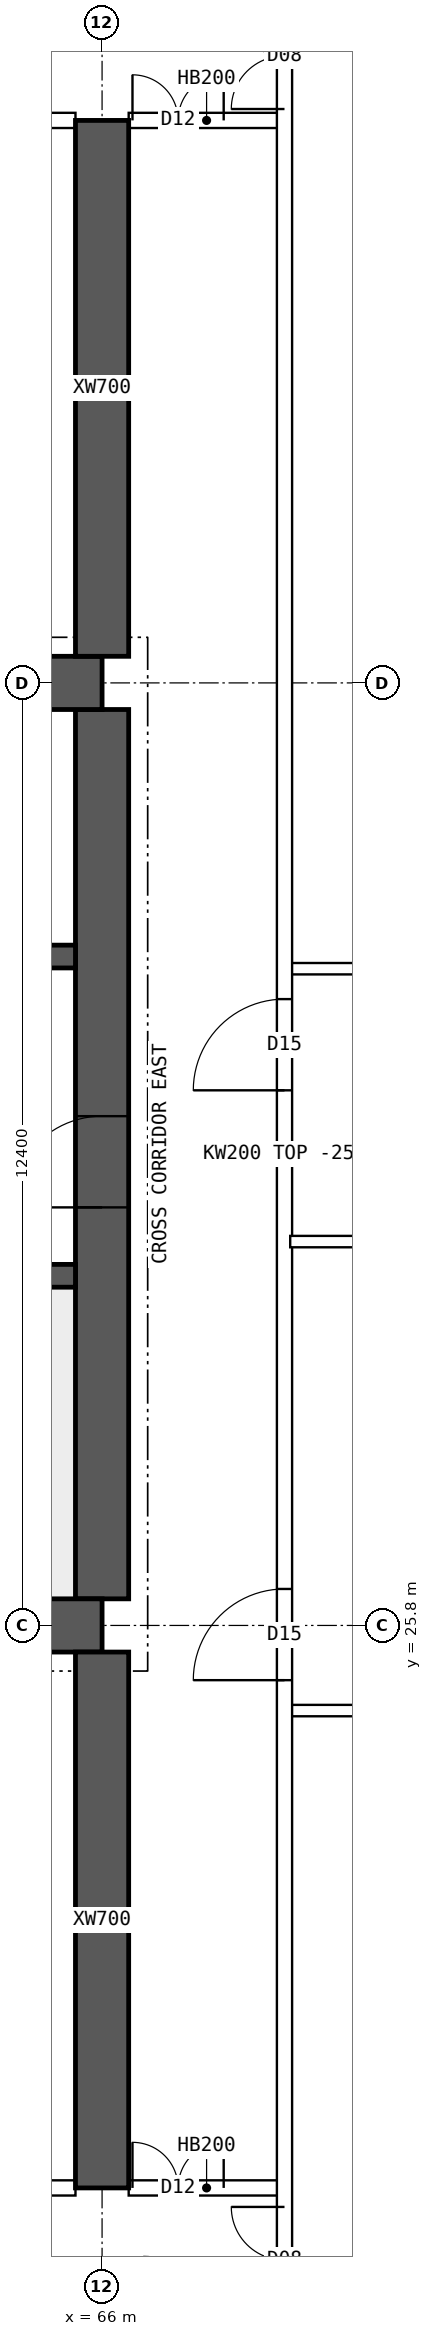
"""IFC4 building model, lengths in metres.
Left out: names, types, materials, properties, quantities, classifications, styles, units other than length and angle.
Written with IfcOpenShell. Run it as: python <this file> out.ifc"""

import sys

from ifc_helpers import new_model, si_unit, direction, frame, frame_2d, origin, place, context, subcontext, project, spatial, polyline, rectangle, outline, extrude, element, fill, save


model = new_model("IFC4")
c1 = context("Model", 3, precision=1e-05, world=origin(), true_north=direction((0.0, 1.0)))
c2 = subcontext(c1, "Body", "Model", "MODEL_VIEW")
j1 = project(units=[si_unit("LENGTHUNIT", "METRE"), si_unit("PLANEANGLEUNIT", "RADIAN")], contexts=[c1])
p1 = place(None, origin())
s1 = spatial("IfcSite", under=j1, at=p1, CompositionType="ELEMENT")
p2 = place(p1, origin())
s2 = spatial("IfcBuilding", under=s1, at=p2, CompositionType="ELEMENT")
p3 = place(p2, frame((0.0, 0.0, 208.3)))
s3 = spatial("IfcBuildingStorey", under=s2, at=p3, CompositionType="ELEMENT", Elevation=208.3)
for number, where, z_axis, x_axis in (
    (1, (18.0, 25.8, 0.0), (0.0, 0.0, 1.0), (1.0, 0.0, 0.0)),
    (2, (18.0, 38.2, 0.0), (0.0, 0.0, 1.0), (1.0, 0.0, 0.0)),
):
    element("IfcWall", number, at=place(p3, frame(where, z_axis=z_axis, x_axis=x_axis)), inside=s3, PredefinedType="SHEAR", context=c2, shape_type="SweptSolid", body=[
        extrude(rectangle(XDim=48.0, YDim=0.7, at=frame_2d((24.0, 0.0))), origin(), (0.0, 0.0, 1.0), 4.5),
    ])
p4 = place(p3, frame((66.0, 26.15, 0.0), z_axis=(0.0, 0.0, 1.0), x_axis=(0.0, 1.0, 0.0)))
e3 = element("IfcWall", 3, at=p4, inside=s3, PredefinedType="SHEAR", context=c2, shape_type="SweptSolid", body=[
    extrude(rectangle(XDim=11.7, YDim=0.7, at=frame_2d((5.85, 0.0))), origin(), (0.0, 0.0, 1.0), 4.5),
])
p5 = place(p4, frame((5.15, 0.0, 0.0)))
e4 = element("IfcOpeningElement", 4, at=p5, cuts=e3, PredefinedType="OPENING", context=c2, shape_type="SweptSolid", body=[
    extrude(rectangle(XDim=1.2, YDim=2.1, at=frame_2d((0.6, 1.05))), frame((0.0, 0.36, 0.0), z_axis=(0.0, -1.0, 0.0), x_axis=(1.0, 0.0, 0.0)), (0.0, 0.0, 1.0), 0.72),
])
p6 = place(p3, frame((18.35, 30.4, 0.0), z_axis=(0.0, 0.0, 1.0), x_axis=(1.0, 0.0, 0.0)))
e5 = element("IfcWall", 5, at=p6, inside=s3, PredefinedType="SHEAR", context=c2, shape_type="SweptSolid", body=[
    extrude(rectangle(XDim=47.3, YDim=0.3, at=frame_2d((23.65, 0.0))), origin(), (0.0, 0.0, 1.0), 4.5),
])
p7 = place(p6, frame((0.4, 0.0, 0.0)))
e6 = element("IfcOpeningElement", 6, at=p7, cuts=e5, PredefinedType="OPENING", context=c2, shape_type="SweptSolid", body=[
    extrude(rectangle(XDim=1.0, YDim=2.1, at=frame_2d((0.5, 1.05))), frame((0.0, 0.16, 0.0), z_axis=(0.0, -1.0, 0.0), x_axis=(1.0, 0.0, 0.0)), (0.0, 0.0, 1.0), 0.32),
])
p8 = place(p6, frame((45.9, 0.0, 0.0)))
e7 = element("IfcOpeningElement", 7, at=p8, cuts=e5, PredefinedType="OPENING", context=c2, shape_type="SweptSolid", body=[
    extrude(rectangle(XDim=1.0, YDim=2.1, at=frame_2d((0.5, 1.05))), frame((0.0, 0.16, 0.0), z_axis=(0.0, -1.0, 0.0), x_axis=(1.0, 0.0, 0.0)), (0.0, 0.0, 1.0), 0.32),
])
p9 = place(p6, frame((8.4, 0.0, 0.0)))
e8 = element("IfcOpeningElement", 8, at=p9, cuts=e5, PredefinedType="OPENING", context=c2, shape_type="SweptSolid", body=[
    extrude(rectangle(XDim=1.1, YDim=2.1, at=frame_2d((0.55, 1.05))), frame((0.0, 0.16, 0.0), z_axis=(0.0, -1.0, 0.0), x_axis=(1.0, 0.0, 0.0)), (0.0, 0.0, 1.0), 0.32),
])
p10 = place(p6, frame((11.0, 0.0, 0.0)))
e9 = element("IfcOpeningElement", 9, at=p10, cuts=e5, PredefinedType="OPENING", context=c2, shape_type="SweptSolid", body=[
    extrude(rectangle(XDim=1.1, YDim=2.1, at=frame_2d((0.55, 1.05))), frame((0.0, 0.16, 0.0), z_axis=(0.0, -1.0, 0.0), x_axis=(1.0, 0.0, 0.0)), (0.0, 0.0, 1.0), 0.32),
])
p11 = place(p6, frame((13.6, 0.0, 0.0)))
e10 = element("IfcOpeningElement", 10, at=p11, cuts=e5, PredefinedType="OPENING", context=c2, shape_type="SweptSolid", body=[
    extrude(rectangle(XDim=1.1, YDim=2.1, at=frame_2d((0.55, 1.05))), frame((0.0, 0.16, 0.0), z_axis=(0.0, -1.0, 0.0), x_axis=(1.0, 0.0, 0.0)), (0.0, 0.0, 1.0), 0.32),
])
p12 = place(p6, frame((16.2, 0.0, 0.0)))
e11 = element("IfcOpeningElement", 11, at=p12, cuts=e5, PredefinedType="OPENING", context=c2, shape_type="SweptSolid", body=[
    extrude(rectangle(XDim=1.1, YDim=2.1, at=frame_2d((0.55, 1.05))), frame((0.0, 0.16, 0.0), z_axis=(0.0, -1.0, 0.0), x_axis=(1.0, 0.0, 0.0)), (0.0, 0.0, 1.0), 0.32),
])
p13 = place(p6, frame((18.975, 0.0, 0.0)))
e12 = element("IfcOpeningElement", 12, at=p13, cuts=e5, PredefinedType="OPENING", context=c2, shape_type="SweptSolid", body=[
    extrude(rectangle(XDim=0.9, YDim=2.1, at=frame_2d((0.45, 1.05))), frame((0.0, 0.16, 0.0), z_axis=(0.0, -1.0, 0.0), x_axis=(1.0, 0.0, 0.0)), (0.0, 0.0, 1.0), 0.32),
])
p14 = place(p6, frame((24.375, 0.0, 0.0)))
e13 = element("IfcOpeningElement", 13, at=p14, cuts=e5, PredefinedType="OPENING", context=c2, shape_type="SweptSolid", body=[
    extrude(rectangle(XDim=1.1, YDim=2.1, at=frame_2d((0.55, 1.05))), frame((0.0, 0.16, 0.0), z_axis=(0.0, -1.0, 0.0), x_axis=(1.0, 0.0, 0.0)), (0.0, 0.0, 1.0), 0.32),
])
p15 = place(p6, frame((27.125, 0.0, 0.0)))
e14 = element("IfcOpeningElement", 14, at=p15, cuts=e5, PredefinedType="OPENING", context=c2, shape_type="SweptSolid", body=[
    extrude(rectangle(XDim=1.1, YDim=2.1, at=frame_2d((0.55, 1.05))), frame((0.0, 0.16, 0.0), z_axis=(0.0, -1.0, 0.0), x_axis=(1.0, 0.0, 0.0)), (0.0, 0.0, 1.0), 0.32),
])
p16 = place(p6, frame((30.267, 0.0, 0.0)))
e15 = element("IfcOpeningElement", 15, at=p16, cuts=e5, PredefinedType="OPENING", context=c2, shape_type="SweptSolid", body=[
    extrude(rectangle(XDim=1.1, YDim=2.1, at=frame_2d((0.55, 1.05))), frame((0.0, 0.16, 0.0), z_axis=(0.0, -1.0, 0.0), x_axis=(1.0, 0.0, 0.0)), (0.0, 0.0, 1.0), 0.32),
])
p17 = place(p6, frame((33.8, 0.0, 0.0)))
e16 = element("IfcOpeningElement", 16, at=p17, cuts=e5, PredefinedType="OPENING", context=c2, shape_type="SweptSolid", body=[
    extrude(rectangle(XDim=1.1, YDim=2.1, at=frame_2d((0.55, 1.05))), frame((0.0, 0.16, 0.0), z_axis=(0.0, -1.0, 0.0), x_axis=(1.0, 0.0, 0.0)), (0.0, 0.0, 1.0), 0.32),
])
p18 = place(p6, frame((37.333, 0.0, 0.0)))
e17 = element("IfcOpeningElement", 17, at=p18, cuts=e5, PredefinedType="OPENING", context=c2, shape_type="SweptSolid", body=[
    extrude(rectangle(XDim=1.1, YDim=2.1, at=frame_2d((0.55, 1.05))), frame((0.0, 0.16, 0.0), z_axis=(0.0, -1.0, 0.0), x_axis=(1.0, 0.0, 0.0)), (0.0, 0.0, 1.0), 0.32),
])
p19 = place(p3, frame((18.35, 34.6, 0.0), z_axis=(0.0, 0.0, 1.0), x_axis=(1.0, 0.0, 0.0)))
e18 = element("IfcWall", 18, at=p19, inside=s3, PredefinedType="SHEAR", context=c2, shape_type="SweptSolid", body=[
    extrude(rectangle(XDim=47.3, YDim=0.3, at=frame_2d((23.65, 0.0))), origin(), (0.0, 0.0, 1.0), 4.5),
])
p20 = place(p19, frame((0.9, 0.0, 0.0)))
e19 = element("IfcOpeningElement", 19, at=p20, cuts=e18, PredefinedType="OPENING", context=c2, shape_type="SweptSolid", body=[
    extrude(rectangle(XDim=1.1, YDim=2.1, at=frame_2d((0.55, 1.05))), frame((0.0, 0.16, 0.0), z_axis=(0.0, -1.0, 0.0), x_axis=(1.0, 0.0, 0.0)), (0.0, 0.0, 1.0), 0.32),
])
p21 = place(p19, frame((45.3, 0.0, 0.0)))
e20 = element("IfcOpeningElement", 20, at=p21, cuts=e18, PredefinedType="OPENING", context=c2, shape_type="SweptSolid", body=[
    extrude(rectangle(XDim=1.1, YDim=2.1, at=frame_2d((0.55, 1.05))), frame((0.0, 0.16, 0.0), z_axis=(0.0, -1.0, 0.0), x_axis=(1.0, 0.0, 0.0)), (0.0, 0.0, 1.0), 0.32),
])
p22 = place(p19, frame((4.25, 0.0, 0.0)))
e21 = element("IfcOpeningElement", 21, at=p22, cuts=e18, PredefinedType="OPENING", context=c2, shape_type="SweptSolid", body=[
    extrude(rectangle(XDim=0.9, YDim=2.1, at=frame_2d((0.45, 1.05))), frame((0.0, 0.16, 0.0), z_axis=(0.0, -1.0, 0.0), x_axis=(1.0, 0.0, 0.0)), (0.0, 0.0, 1.0), 0.32),
])
p23 = place(p19, frame((42.15, 0.0, 0.0)))
e22 = element("IfcOpeningElement", 22, at=p23, cuts=e18, PredefinedType="OPENING", context=c2, shape_type="SweptSolid", body=[
    extrude(rectangle(XDim=0.9, YDim=2.1, at=frame_2d((0.45, 1.05))), frame((0.0, 0.16, 0.0), z_axis=(0.0, -1.0, 0.0), x_axis=(1.0, 0.0, 0.0)), (0.0, 0.0, 1.0), 0.32),
])
p24 = place(p19, frame((9.025, 0.0, 0.0)))
e23 = element("IfcOpeningElement", 23, at=p24, cuts=e18, PredefinedType="OPENING", context=c2, shape_type="SweptSolid", body=[
    extrude(rectangle(XDim=0.9, YDim=2.1, at=frame_2d((0.45, 1.05))), frame((0.0, 0.16, 0.0), z_axis=(0.0, -1.0, 0.0), x_axis=(1.0, 0.0, 0.0)), (0.0, 0.0, 1.0), 0.32),
])
p25 = place(p19, frame((12.999, 0.0, 0.0)))
e24 = element("IfcOpeningElement", 24, at=p25, cuts=e18, PredefinedType="OPENING", context=c2, shape_type="SweptSolid", body=[
    extrude(rectangle(XDim=0.9, YDim=2.1, at=frame_2d((0.45, 1.05))), frame((0.0, 0.16, 0.0), z_axis=(0.0, -1.0, 0.0), x_axis=(1.0, 0.0, 0.0)), (0.0, 0.0, 1.0), 0.32),
])
p26 = place(p19, frame((16.646, 0.0, 0.0)))
e25 = element("IfcOpeningElement", 25, at=p26, cuts=e18, PredefinedType="OPENING", context=c2, shape_type="SweptSolid", body=[
    extrude(rectangle(XDim=0.9, YDim=2.1, at=frame_2d((0.45, 1.05))), frame((0.0, 0.16, 0.0), z_axis=(0.0, -1.0, 0.0), x_axis=(1.0, 0.0, 0.0)), (0.0, 0.0, 1.0), 0.32),
])
p27 = place(p19, frame((20.405, 0.0, 0.0)))
e26 = element("IfcOpeningElement", 26, at=p27, cuts=e18, PredefinedType="OPENING", context=c2, shape_type="SweptSolid", body=[
    extrude(rectangle(XDim=0.9, YDim=2.1, at=frame_2d((0.45, 1.05))), frame((0.0, 0.16, 0.0), z_axis=(0.0, -1.0, 0.0), x_axis=(1.0, 0.0, 0.0)), (0.0, 0.0, 1.0), 0.32),
])
p28 = place(p19, frame((24.811, 0.0, 0.0)))
e27 = element("IfcOpeningElement", 27, at=p28, cuts=e18, PredefinedType="OPENING", context=c2, shape_type="SweptSolid", body=[
    extrude(rectangle(XDim=0.9, YDim=2.1, at=frame_2d((0.45, 1.05))), frame((0.0, 0.16, 0.0), z_axis=(0.0, -1.0, 0.0), x_axis=(1.0, 0.0, 0.0)), (0.0, 0.0, 1.0), 0.32),
])
p29 = place(p19, frame((27.608, 0.0, 0.0)))
e28 = element("IfcOpeningElement", 28, at=p29, cuts=e18, PredefinedType="OPENING", context=c2, shape_type="SweptSolid", body=[
    extrude(rectangle(XDim=0.9, YDim=2.1, at=frame_2d((0.45, 1.05))), frame((0.0, 0.16, 0.0), z_axis=(0.0, -1.0, 0.0), x_axis=(1.0, 0.0, 0.0)), (0.0, 0.0, 1.0), 0.32),
])
p30 = place(p19, frame((29.981, 0.0, 0.0)))
e29 = element("IfcOpeningElement", 29, at=p30, cuts=e18, PredefinedType="OPENING", context=c2, shape_type="SweptSolid", body=[
    extrude(rectangle(XDim=0.9, YDim=2.1, at=frame_2d((0.45, 1.05))), frame((0.0, 0.16, 0.0), z_axis=(0.0, -1.0, 0.0), x_axis=(1.0, 0.0, 0.0)), (0.0, 0.0, 1.0), 0.32),
])
p31 = place(p19, frame((35.451, 0.0, 0.0)))
e30 = element("IfcOpeningElement", 30, at=p31, cuts=e18, PredefinedType="OPENING", context=c2, shape_type="SweptSolid", body=[
    extrude(rectangle(XDim=0.9, YDim=2.1, at=frame_2d((0.45, 1.05))), frame((0.0, 0.16, 0.0), z_axis=(0.0, -1.0, 0.0), x_axis=(1.0, 0.0, 0.0)), (0.0, 0.0, 1.0), 0.32),
])
for number, where, z_axis, x_axis in (
    (31, (66.0, 18.4, 0.0), (0.0, 0.0, 1.0), (0.0, 1.0, 0.0)),
    (32, (66.0, 38.55, 0.0), (0.0, 0.0, 1.0), (0.0, 1.0, 0.0)),
):
    element("IfcWall", number, at=place(p3, frame(where, z_axis=z_axis, x_axis=x_axis)), inside=s3, PredefinedType="SHEAR", context=c2, shape_type="SweptSolid", body=[
        extrude(rectangle(XDim=7.05, YDim=0.7, at=frame_2d((3.525, 0.0))), origin(), (0.0, 0.0, 1.0), 4.5),
    ])
p32 = place(p3, frame((60.35, 18.4, 0.0), z_axis=(0.0, 0.0, 1.0), x_axis=(1.0, 0.0, 0.0)))
e33 = element("IfcWall", 33, at=p32, inside=s3, PredefinedType="SOLIDWALL", context=c2, shape_type="SweptSolid", body=[
    extrude(rectangle(XDim=5.3, YDim=0.2, at=frame_2d((2.65, 0.0))), origin(), (0.0, 0.0, 1.0), 4.25),
])
p33 = place(p32, frame((0.15, 0.0, 0.0)))
e34 = element("IfcOpeningElement", 34, at=p33, cuts=e33, PredefinedType="OPENING", context=c2, shape_type="SweptSolid", body=[
    extrude(rectangle(XDim=0.9, YDim=2.1, at=frame_2d((0.45, 1.05))), frame((0.0, 0.11, 0.0), z_axis=(0.0, -1.0, 0.0), x_axis=(1.0, 0.0, 0.0)), (0.0, 0.0, 1.0), 0.22),
])
p34 = place(p32, frame((3.435, 0.0, 0.0)))
e35 = element("IfcOpeningElement", 35, at=p34, cuts=e33, PredefinedType="OPENING", context=c2, shape_type="SweptSolid", body=[
    extrude(rectangle(XDim=0.9, YDim=2.1, at=frame_2d((0.45, 1.05))), frame((0.0, 0.11, 0.0), z_axis=(0.0, -1.0, 0.0), x_axis=(1.0, 0.0, 0.0)), (0.0, 0.0, 1.0), 0.22),
])
p35 = place(p3, frame((66.35, 18.4, 0.0), z_axis=(0.0, 0.0, 1.0), x_axis=(1.0, 0.0, 0.0)))
e36 = element("IfcWall", 36, at=p35, inside=s3, PredefinedType="SOLIDWALL", context=c2, shape_type="SweptSolid", body=[
    extrude(rectangle(XDim=2.05, YDim=0.2, at=frame_2d((1.025, 0.0))), origin(), (0.0, 0.0, 1.0), 4.25),
])
p36 = place(p35, frame((0.05, 0.0, 0.0)))
e37 = element("IfcOpeningElement", 37, at=p36, cuts=e36, PredefinedType="OPENING", context=c2, shape_type="SweptSolid", body=[
    extrude(rectangle(XDim=1.2, YDim=2.1, at=frame_2d((0.6, 1.05))), frame((0.0, 0.11, 0.0), z_axis=(0.0, -1.0, 0.0), x_axis=(1.0, 0.0, 0.0)), (0.0, 0.0, 1.0), 0.22),
])
p37 = place(p3, frame((60.35, 45.6, 0.0), z_axis=(0.0, 0.0, 1.0), x_axis=(1.0, 0.0, 0.0)))
e38 = element("IfcWall", 38, at=p37, inside=s3, PredefinedType="SOLIDWALL", context=c2, shape_type="SweptSolid", body=[
    extrude(rectangle(XDim=5.3, YDim=0.2, at=frame_2d((2.65, 0.0))), origin(), (0.0, 0.0, 1.0), 4.25),
])
p38 = place(p37, frame((0.15, 0.0, 0.0)))
e39 = element("IfcOpeningElement", 39, at=p38, cuts=e38, PredefinedType="OPENING", context=c2, shape_type="SweptSolid", body=[
    extrude(rectangle(XDim=0.9, YDim=2.1, at=frame_2d((0.45, 1.05))), frame((0.0, 0.11, 0.0), z_axis=(0.0, -1.0, 0.0), x_axis=(1.0, 0.0, 0.0)), (0.0, 0.0, 1.0), 0.22),
])
p39 = place(p37, frame((2.42, 0.0, 0.0)))
e40 = element("IfcOpeningElement", 40, at=p39, cuts=e38, PredefinedType="OPENING", context=c2, shape_type="SweptSolid", body=[
    extrude(rectangle(XDim=0.9, YDim=2.1, at=frame_2d((0.45, 1.05))), frame((0.0, 0.11, 0.0), z_axis=(0.0, -1.0, 0.0), x_axis=(1.0, 0.0, 0.0)), (0.0, 0.0, 1.0), 0.22),
])
p40 = place(p3, frame((66.35, 45.6, 0.0), z_axis=(0.0, 0.0, 1.0), x_axis=(1.0, 0.0, 0.0)))
e41 = element("IfcWall", 41, at=p40, inside=s3, PredefinedType="SOLIDWALL", context=c2, shape_type="SweptSolid", body=[
    extrude(rectangle(XDim=2.05, YDim=0.2, at=frame_2d((1.025, 0.0))), origin(), (0.0, 0.0, 1.0), 4.25),
])
p41 = place(p40, frame((0.05, 0.0, 0.0)))
e42 = element("IfcOpeningElement", 42, at=p41, cuts=e41, PredefinedType="OPENING", context=c2, shape_type="SweptSolid", body=[
    extrude(rectangle(XDim=1.2, YDim=2.1, at=frame_2d((0.6, 1.05))), frame((0.0, 0.11, 0.0), z_axis=(0.0, -1.0, 0.0), x_axis=(1.0, 0.0, 0.0)), (0.0, 0.0, 1.0), 0.22),
])
p42 = place(p3, frame((68.475, 30.85, 0.0), z_axis=(0.0, 0.0, 1.0), x_axis=(1.0, 0.0, 0.0)))
e43 = element("IfcWall", 43, at=p42, inside=s3, PredefinedType="PARTITIONING", context=c2, shape_type="SweptSolid", body=[
    extrude(outline(polyline([(0.0, 0.0), (6.82, 0.0), (6.82, 4.25), (3.827, 4.25), (3.825, 3.8), (3.227, 3.8), (3.225, 4.25), (0.0, 4.25), (0.0, 0.0)])), frame((0.0, 0.075, 0.0), z_axis=(0.0, -1.0, 0.0), x_axis=(1.0, 0.0, 0.0)), (0.0, 0.0, 1.0), 0.15),
])
p43 = place(p3, frame((68.4, 11.646, 0.0), z_axis=(0.0, 0.0, 1.0), x_axis=(0.0, 1.0, 0.0)))
e44 = element("IfcWall", 44, at=p43, inside=s3, PredefinedType="SOLIDWALL", context=c2, shape_type="SweptSolid", body=[
    extrude(rectangle(XDim=40.708, YDim=0.2, at=frame_2d((20.354, 0.0))), origin(), (0.0, 0.0, 1.0), 4.25),
])
p44 = place(p43, frame((13.434, 0.0, 0.0)))
e45 = element("IfcOpeningElement", 45, at=p44, cuts=e44, PredefinedType="OPENING", context=c2, shape_type="SweptSolid", body=[
    extrude(rectangle(XDim=1.2, YDim=2.1, at=frame_2d((0.6, 1.05))), frame((0.0, 0.11, 0.0), z_axis=(0.0, -1.0, 0.0), x_axis=(1.0, 0.0, 0.0)), (0.0, 0.0, 1.0), 0.22),
])
p45 = place(p43, frame((21.194, 0.0, 0.0)))
e46 = element("IfcOpeningElement", 46, at=p45, cuts=e44, PredefinedType="OPENING", context=c2, shape_type="SweptSolid", body=[
    extrude(rectangle(XDim=1.2, YDim=2.1, at=frame_2d((0.6, 1.05))), frame((0.0, 0.11, 0.0), z_axis=(0.0, -1.0, 0.0), x_axis=(1.0, 0.0, 0.0)), (0.0, 0.0, 1.0), 0.22),
])
p46 = place(p43, frame((5.104, 0.0, 0.0)))
e47 = element("IfcOpeningElement", 47, at=p46, cuts=e44, PredefinedType="OPENING", context=c2, shape_type="SweptSolid", body=[
    extrude(rectangle(XDim=1.4, YDim=2.1, at=frame_2d((0.7, 1.05))), frame((0.0, 0.11, 0.0), z_axis=(0.0, -1.0, 0.0), x_axis=(1.0, 0.0, 0.0)), (0.0, 0.0, 1.0), 0.22),
])
p47 = place(p43, frame((34.104, 0.0, 0.0)))
e48 = element("IfcOpeningElement", 48, at=p47, cuts=e44, PredefinedType="OPENING", context=c2, shape_type="SweptSolid", body=[
    extrude(rectangle(XDim=1.4, YDim=2.1, at=frame_2d((0.7, 1.05))), frame((0.0, 0.11, 0.0), z_axis=(0.0, -1.0, 0.0), x_axis=(1.0, 0.0, 0.0)), (0.0, 0.0, 1.0), 0.22),
])
p48 = place(p3, frame((68.475, 24.68, 0.0), z_axis=(0.0, 0.0, 1.0), x_axis=(1.0, 0.0, 0.0)))
e49 = element("IfcWall", 49, at=p48, inside=s3, PredefinedType="PARTITIONING", context=c2, shape_type="SweptSolid", body=[
    extrude(rectangle(XDim=6.82, YDim=0.15, at=frame_2d((3.41, 0.0))), origin(), (0.0, 0.0, 1.0), 4.25),
])
p49 = place(p3, frame((68.475, 34.44, 0.0), z_axis=(0.0, 0.0, 1.0), x_axis=(1.0, 0.0, 0.0)))
e50 = element("IfcWall", 50, at=p49, inside=s3, PredefinedType="PARTITIONING", context=c2, shape_type="SweptSolid", body=[
    extrude(outline(polyline([(0.0, 0.0), (6.82, 0.0), (6.82, 4.25), (3.827, 4.25), (3.825, 3.8), (3.227, 3.8), (3.225, 4.25), (0.0, 4.25), (0.0, 0.0)])), frame((0.0, 0.075, 0.0), z_axis=(0.0, -1.0, 0.0), x_axis=(1.0, 0.0, 0.0)), (0.0, 0.0, 1.0), 0.15),
])
p50 = place(p5, origin())
e51 = element("IfcDoor", 51, at=p50, inside=s3, OperationType="SINGLE_SWING_LEFT", PredefinedType="DOOR", context=c2, shape_type="SweptSolid", body=[
    extrude(rectangle(XDim=1.2, YDim=2.1, at=frame_2d((0.6, 1.05))), frame((0.0, 0.025, 0.0), z_axis=(0.0, -1.0, 0.0), x_axis=(1.0, 0.0, 0.0)), (0.0, 0.0, 1.0), 0.05),
])
fill(e4, e51)
p51 = place(p36, origin())
e52 = element("IfcDoor", 52, at=p51, inside=s3, OperationType="DOUBLE_DOOR_SINGLE_SWING", PredefinedType="DOOR", context=c2, shape_type="SweptSolid", body=[
    extrude(rectangle(XDim=1.2, YDim=2.1, at=frame_2d((0.6, 1.05))), frame((0.0, 0.025, 0.0), z_axis=(0.0, -1.0, 0.0), x_axis=(1.0, 0.0, 0.0)), (0.0, 0.0, 1.0), 0.05),
])
fill(e37, e52)
p52 = place(p41, origin())
e53 = element("IfcDoor", 53, at=p52, inside=s3, OperationType="DOUBLE_DOOR_SINGLE_SWING", PredefinedType="DOOR", context=c2, shape_type="SweptSolid", body=[
    extrude(rectangle(XDim=1.2, YDim=2.1, at=frame_2d((0.6, 1.05))), frame((0.0, 0.025, 0.0), z_axis=(0.0, -1.0, 0.0), x_axis=(1.0, 0.0, 0.0)), (0.0, 0.0, 1.0), 0.05),
])
fill(e42, e53)
p53 = place(p44, origin())
e54 = element("IfcDoor", 54, at=p53, inside=s3, OperationType="SINGLE_SWING_LEFT", PredefinedType="DOOR", context=c2, shape_type="SweptSolid", body=[
    extrude(rectangle(XDim=1.2, YDim=2.1, at=frame_2d((0.6, 1.05))), frame((0.0, 0.025, 0.0), z_axis=(0.0, -1.0, 0.0), x_axis=(1.0, 0.0, 0.0)), (0.0, 0.0, 1.0), 0.05),
])
fill(e45, e54)
p54 = place(p45, origin())
e55 = element("IfcDoor", 55, at=p54, inside=s3, OperationType="SINGLE_SWING_LEFT", PredefinedType="DOOR", context=c2, shape_type="SweptSolid", body=[
    extrude(rectangle(XDim=1.2, YDim=2.1, at=frame_2d((0.6, 1.05))), frame((0.0, 0.025, 0.0), z_axis=(0.0, -1.0, 0.0), x_axis=(1.0, 0.0, 0.0)), (0.0, 0.0, 1.0), 0.05),
])
fill(e46, e55)
p55 = place(p46, origin())
e56 = element("IfcDoor", 56, at=p55, inside=s3, OperationType="DOUBLE_DOOR_SINGLE_SWING", PredefinedType="DOOR", context=c2, shape_type="SweptSolid", body=[
    extrude(rectangle(XDim=1.4, YDim=2.1, at=frame_2d((0.7, 1.05))), frame((0.0, 0.025, 0.0), z_axis=(0.0, -1.0, 0.0), x_axis=(1.0, 0.0, 0.0)), (0.0, 0.0, 1.0), 0.05),
])
fill(e47, e56)
p56 = place(p47, origin())
e57 = element("IfcDoor", 57, at=p56, inside=s3, OperationType="DOUBLE_DOOR_SINGLE_SWING", PredefinedType="DOOR", context=c2, shape_type="SweptSolid", body=[
    extrude(rectangle(XDim=1.4, YDim=2.1, at=frame_2d((0.7, 1.05))), frame((0.0, 0.025, 0.0), z_axis=(0.0, -1.0, 0.0), x_axis=(1.0, 0.0, 0.0)), (0.0, 0.0, 1.0), 0.05),
])
fill(e48, e57)
save(model, sys.argv[1])
